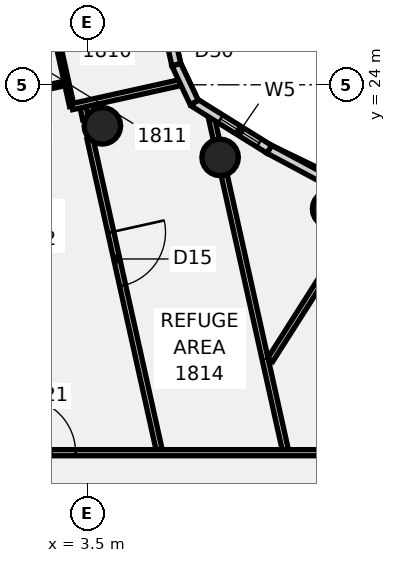
"""IFC4 building model, lengths in metres.
Left out: names, types, materials, properties, quantities, classifications, styles, units other than length and angle.
Written with IfcOpenShell. Run it as: python <this file> out.ifc"""

import sys

from ifc_helpers import new_model, si_unit, direction, frame, frame_2d, origin, origin_2d, place, context, subcontext, project, spatial, rectangle, circle, extrude, element, fill, save


model = new_model("IFC4")
c1 = context("Model", 3, precision=1e-05, world=origin(), true_north=direction((0.0, 1.0)))
c2 = subcontext(c1, "Body", "Model", "MODEL_VIEW")
j1 = project(units=[si_unit("LENGTHUNIT", "METRE"), si_unit("PLANEANGLEUNIT", "RADIAN")], contexts=[c1])
p1 = place(None, origin())
s1 = spatial("IfcSite", under=j1, at=p1, CompositionType="ELEMENT")
p2 = place(p1, origin())
s2 = spatial("IfcBuilding", under=s1, at=p2, CompositionType="ELEMENT")
p3 = place(p2, frame((0.0, 0.0, 79.0)))
s3 = spatial("IfcBuildingStorey", under=s2, at=p3, CompositionType="ELEMENT", Elevation=79.0)
for number, where, z_axis, x_axis in (
    (1, (11.5, 19.919, -0.18), (0.0, 0.0, 1.0), (1.0, 0.0, 0.0)),
    (2, (7.866, 21.613, -0.18), (0.0, 0.0, 1.0), (1.0, 0.0, 0.0)),
    (3, (3.994, 22.651, -0.18), (0.0, 0.0, 1.0), (1.0, 0.0, 0.0)),
):
    element("IfcColumn", number, at=place(p3, frame(where, z_axis=z_axis, x_axis=x_axis)), inside=s3, PredefinedType="COLUMN", context=c2, shape_type="SweptSolid", body=[
        extrude(circle(Radius=0.6, at=origin_2d()), origin(), (0.0, 0.0, 1.0), 4.54),
    ])
p4 = place(p3, frame((2.32, 26.311, 0.0), z_axis=(0.0, 0.0, 1.0), x_axis=(0.216662333141, -0.976246604807, 0.0)))
e4 = element("IfcWall", 4, at=p4, inside=s3, PredefinedType="PARTITIONING", context=c2, shape_type="SweptSolid", body=[
    extrude(rectangle(XDim=3.085, YDim=0.15, at=frame_2d((1.542, 0.0))), origin(), (0.0, 0.0, 1.0), 3.66),
])
p5 = place(p3, frame((3.357, 23.258, 0.0), z_axis=(0.0, 0.0, 1.0), x_axis=(0.216995545152, -0.976172594055, 0.0)))
e5 = element("IfcWall", 5, at=p5, inside=s3, PredefinedType="PARTITIONING", context=c2, shape_type="SweptSolid", body=[
    extrude(rectangle(XDim=0.397, YDim=0.2, at=frame_2d((0.199, 0.0))), origin(), (0.0, 0.0, 1.0), 3.66),
])
p6 = place(p3, frame((3.587, 22.225, 0.0), z_axis=(0.0, 0.0, 1.0), x_axis=(0.21703911185, -0.976162908498, 0.0)))
e6 = element("IfcWall", 6, at=p6, inside=s3, PredefinedType="PARTITIONING", context=c2, shape_type="SweptSolid", body=[
    extrude(rectangle(XDim=10.468, YDim=0.2, at=frame_2d((5.234, 0.0))), origin(), (0.0, 0.0, 1.0), 3.66),
])
p7 = place(p6, frame((3.15, 0.0, 0.0)))
e7 = element("IfcOpeningElement", 7, at=p7, cuts=e6, PredefinedType="OPENING", context=c2, shape_type="SweptSolid", body=[
    extrude(rectangle(XDim=1.8, YDim=2.1, at=frame_2d((0.9, 1.05))), frame((0.0, 0.11, 0.0), z_axis=(0.0, -1.0, 0.0), x_axis=(1.0, 0.0, 0.0)), (0.0, 0.0, 1.0), 0.22),
])
p8 = place(p3, frame((7.589, 22.882, 0.0), z_axis=(0.0, 0.0, 1.0), x_axis=(0.217003399532, -0.976170848055, 0.0)))
e8 = element("IfcWall", 8, at=p8, inside=s3, PredefinedType="PARTITIONING", context=c2, shape_type="SweptSolid", body=[
    extrude(rectangle(XDim=0.709, YDim=0.2, at=frame_2d((0.354, 0.0))), origin(), (0.0, 0.0, 1.0), 3.66),
])
p9 = place(p3, frame((7.999, 21.039, 0.0), z_axis=(0.0, 0.0, 1.0), x_axis=(0.217134305932, -0.976141738267, 0.0)))
e9 = element("IfcWall", 9, at=p9, inside=s3, PredefinedType="PARTITIONING", context=c2, shape_type="SweptSolid", body=[
    extrude(rectangle(XDim=9.257, YDim=0.2, at=frame_2d((4.628, 0.0))), origin(), (0.0, 0.0, 1.0), 3.66),
])
p10 = place(p3, frame((-17.045, 11.9, 0.0), z_axis=(0.0, 0.0, 1.0), x_axis=(1.0, 0.0, 0.0)))
e10 = element("IfcWall", 10, at=p10, inside=s3, PredefinedType="PARTITIONING", context=c2, shape_type="SweptSolid", body=[
    extrude(rectangle(XDim=34.145, YDim=0.2, at=frame_2d((17.073, 0.0))), origin(), (0.0, 0.0, 1.0), 3.66),
])
p11 = place(p10, frame((18.358, 0.0, 0.0)))
e11 = element("IfcOpeningElement", 11, at=p11, cuts=e10, PredefinedType="OPENING", context=c2, shape_type="SweptSolid", body=[
    extrude(rectangle(XDim=1.8, YDim=2.1, at=frame_2d((0.9, 1.05))), frame((0.0, 0.11, 0.0), z_axis=(0.0, -1.0, 0.0), x_axis=(1.0, 0.0, 0.0)), (0.0, 0.0, 1.0), 0.22),
])
p12 = place(p10, frame((28.877, 0.0, 0.0)))
e12 = element("IfcOpeningElement", 12, at=p12, cuts=e10, PredefinedType="OPENING", context=c2, shape_type="SweptSolid", body=[
    extrude(rectangle(XDim=1.8, YDim=2.1, at=frame_2d((0.9, 1.05))), frame((0.0, 0.11, 0.0), z_axis=(0.0, -1.0, 0.0), x_axis=(1.0, 0.0, 0.0)), (0.0, 0.0, 1.0), 0.22),
])
p13 = place(p10, frame((4.895, 0.0, 0.0)))
e13 = element("IfcOpeningElement", 13, at=p13, cuts=e10, PredefinedType="OPENING", context=c2, shape_type="SweptSolid", body=[
    extrude(rectangle(XDim=1.8, YDim=2.1, at=frame_2d((0.9, 1.05))), frame((0.0, 0.11, 0.0), z_axis=(0.0, -1.0, 0.0), x_axis=(1.0, 0.0, 0.0)), (0.0, 0.0, 1.0), 0.22),
])
p14 = place(p3, frame((-7.707, 24.179, 0.0), z_axis=(0.0, 0.0, 1.0), x_axis=(0.976033065583, 0.21762227572, 0.0)))
e14 = element("IfcWall", 14, at=p14, inside=s3, PredefinedType="PARTITIONING", context=c2, shape_type="SweptSolid", body=[
    extrude(rectangle(XDim=13.75, YDim=0.2, at=frame_2d((6.875, 0.0))), origin(), (0.0, 0.0, 1.0), 3.66),
])
p15 = place(p14, frame((6.151, 0.0, 0.0)))
e15 = element("IfcOpeningElement", 15, at=p15, cuts=e14, PredefinedType="OPENING", context=c2, shape_type="SweptSolid", body=[
    extrude(rectangle(XDim=1.4, YDim=2.1, at=frame_2d((0.7, 1.05))), frame((0.0, 0.11, 0.0), z_axis=(0.0, -1.0, 0.0), x_axis=(1.0, 0.0, 0.0)), (0.0, 0.0, 1.0), 0.22),
])
p16 = place(p14, frame((1.23, 0.0, 0.0)))
e16 = element("IfcOpeningElement", 16, at=p16, cuts=e14, PredefinedType="OPENING", context=c2, shape_type="SweptSolid", body=[
    extrude(rectangle(XDim=0.9, YDim=2.1, at=frame_2d((0.45, 1.05))), frame((0.0, 0.11, 0.0), z_axis=(0.0, -1.0, 0.0), x_axis=(1.0, 0.0, 0.0)), (0.0, 0.0, 1.0), 0.22),
])
p17 = place(p14, frame((11.151, 0.0, 0.0)))
e17 = element("IfcOpeningElement", 17, at=p17, cuts=e14, PredefinedType="OPENING", context=c2, shape_type="SweptSolid", body=[
    extrude(rectangle(XDim=0.9, YDim=2.1, at=frame_2d((0.45, 1.05))), frame((0.0, 0.11, 0.0), z_axis=(0.0, -1.0, 0.0), x_axis=(1.0, 0.0, 0.0)), (0.0, 0.0, 1.0), 0.22),
])
p18 = place(p3, frame((0.867, 23.627, 0.0), z_axis=(0.0, 0.0, 1.0), x_axis=(0.976187060184, 0.216930457819, 0.0)))
e18 = element("IfcWall", 18, at=p18, inside=s3, PredefinedType="PARTITIONING", context=c2, shape_type="SweptSolid", body=[
    extrude(rectangle(XDim=1.925, YDim=0.15, at=frame_2d((0.962, 0.0))), origin(), (0.0, 0.0, 1.0), 3.66),
])
p19 = place(p3, frame((2.993, 23.28, 0.0), z_axis=(0.0, 0.0, 1.0), x_axis=(0.976190222355, 0.21691622756, 0.0)))
e19 = element("IfcWall", 19, at=p19, inside=s3, PredefinedType="PARTITIONING", context=c2, shape_type="SweptSolid", body=[
    extrude(rectangle(XDim=3.633, YDim=0.2, at=frame_2d((1.816, 0.0))), origin(), (0.0, 0.0, 1.0), 3.66),
])
p20 = place(p3, frame((9.513, 14.952, 0.0), z_axis=(0.0, 0.0, 1.0), x_axis=(0.536804820056, 0.843706456752, 0.0)))
e20 = element("IfcWall", 20, at=p20, inside=s3, PredefinedType="PARTITIONING", context=c2, shape_type="SweptSolid", body=[
    extrude(rectangle(XDim=6.259, YDim=0.2, at=frame_2d((3.129, 0.0))), origin(), (0.0, 0.0, 1.0), 3.66),
])
p21 = place(p3, frame((12.956, 20.019, 0.0), z_axis=(0.0, 0.0, 1.0), x_axis=(-0.881521417359, 0.472144036007, 0.0)))
e21 = element("IfcWall", 21, at=p21, inside=s3, PredefinedType="SOLIDWALL", context=c2, shape_type="SweptSolid", body=[
    extrude(rectangle(XDim=3.94, YDim=0.3, at=frame_2d((1.97, 0.0))), origin(), (0.0, 0.0, 1.0), 4.36),
])
p22 = place(p3, frame((9.483, 21.879, 0.0), z_axis=(0.0, 0.0, 1.0), x_axis=(-0.848648189987, 0.528957701174, 0.0)))
e22 = element("IfcWall", 22, at=p22, inside=s3, PredefinedType="SOLIDWALL", context=c2, shape_type="SweptSolid", body=[
    extrude(rectangle(XDim=2.91, YDim=0.3, at=frame_2d((1.455, 0.0))), origin(), (0.0, 0.0, 1.0), 4.36),
])
p23 = place(p22, frame((0.39, 0.0, 1.4)))
e23 = element("IfcOpeningElement", 23, at=p23, cuts=e22, PredefinedType="OPENING", context=c2, shape_type="SweptSolid", body=[
    extrude(rectangle(XDim=1.5, YDim=1.0, at=frame_2d((0.75, 0.5))), frame((0.0, 0.16, 0.0), z_axis=(0.0, -1.0, 0.0), x_axis=(1.0, 0.0, 0.0)), (0.0, 0.0, 1.0), 0.32),
])
p24 = place(p3, frame((7.014, 23.418, 0.0), z_axis=(0.0, 0.0, 1.0), x_axis=(-0.427195365071, 0.904159344398, 0.0)))
e24 = element("IfcWall", 24, at=p24, inside=s3, PredefinedType="SOLIDWALL", context=c2, shape_type="SweptSolid", body=[
    extrude(rectangle(XDim=1.378, YDim=0.3, at=frame_2d((0.689, 0.0))), origin(), (0.0, 0.0, 1.0), 4.36),
])
p25 = place(p3, frame((6.425, 24.665, 0.0), z_axis=(0.0, 0.0, 1.0), x_axis=(-0.217081929523, 0.976153387473, 0.0)))
e25 = element("IfcWall", 25, at=p25, inside=s3, PredefinedType="SOLIDWALL", context=c2, shape_type="SweptSolid", body=[
    extrude(rectangle(XDim=23.892, YDim=0.3, at=frame_2d((11.946, 0.0))), origin(), (0.0, 0.0, 1.0), 4.36),
])
p26 = place(p25, frame((3.852, 0.0, 1.4)))
e26 = element("IfcOpeningElement", 26, at=p26, cuts=e25, PredefinedType="OPENING", context=c2, shape_type="SweptSolid", body=[
    extrude(rectangle(XDim=2.254, YDim=2.6, at=frame_2d((1.127, 1.3))), frame((0.0, 0.16, 0.0), z_axis=(0.0, -1.0, 0.0), x_axis=(1.0, 0.0, 0.0)), (0.0, 0.0, 1.0), 0.32),
])
p27 = place(p25, frame((1.15, 0.0, 1.4)))
e27 = element("IfcOpeningElement", 27, at=p27, cuts=e25, PredefinedType="OPENING", context=c2, shape_type="SweptSolid", body=[
    extrude(rectangle(XDim=2.4, YDim=2.1, at=frame_2d((1.2, 1.05))), frame((0.0, 0.16, 0.0), z_axis=(0.0, -1.0, 0.0), x_axis=(1.0, 0.0, 0.0)), (0.0, 0.0, 1.0), 0.32),
])
p28 = place(p7, origin())
e28 = element("IfcDoor", 28, at=p28, inside=s3, OperationType="DOUBLE_DOOR_SINGLE_SWING", PredefinedType="DOOR", context=c2, shape_type="SweptSolid", body=[
    extrude(rectangle(XDim=1.8, YDim=2.1, at=frame_2d((0.9, 1.05))), frame((0.0, 0.025, 0.0), z_axis=(0.0, -1.0, 0.0), x_axis=(1.0, 0.0, 0.0)), (0.0, 0.0, 1.0), 0.05),
])
fill(e7, e28)
p29 = place(p11, frame((1.8, 0.0, 0.0), z_axis=(0.0, 0.0, 1.0), x_axis=(-1.0, 0.0, 0.0)))
e29 = element("IfcDoor", 29, at=p29, inside=s3, OperationType="DOUBLE_DOOR_SINGLE_SWING", PredefinedType="DOOR", context=c2, shape_type="SweptSolid", body=[
    extrude(rectangle(XDim=1.8, YDim=2.1, at=frame_2d((0.9, 1.05))), frame((0.0, 0.025, 0.0), z_axis=(0.0, -1.0, 0.0), x_axis=(1.0, 0.0, 0.0)), (0.0, 0.0, 1.0), 0.05),
])
fill(e11, e29)
p30 = place(p23, origin())
e30 = element("IfcWindow", 30, at=p30, inside=s3, PartitioningType="SINGLE_PANEL", PredefinedType="WINDOW", context=c2, shape_type="SweptSolid", body=[
    extrude(rectangle(XDim=1.5, YDim=1.0, at=frame_2d((0.75, 0.5))), frame((0.0, 0.03, 0.0), z_axis=(0.0, -1.0, 0.0), x_axis=(1.0, 0.0, 0.0)), (0.0, 0.0, 1.0), 0.06),
])
fill(e23, e30)
save(model, sys.argv[1])
